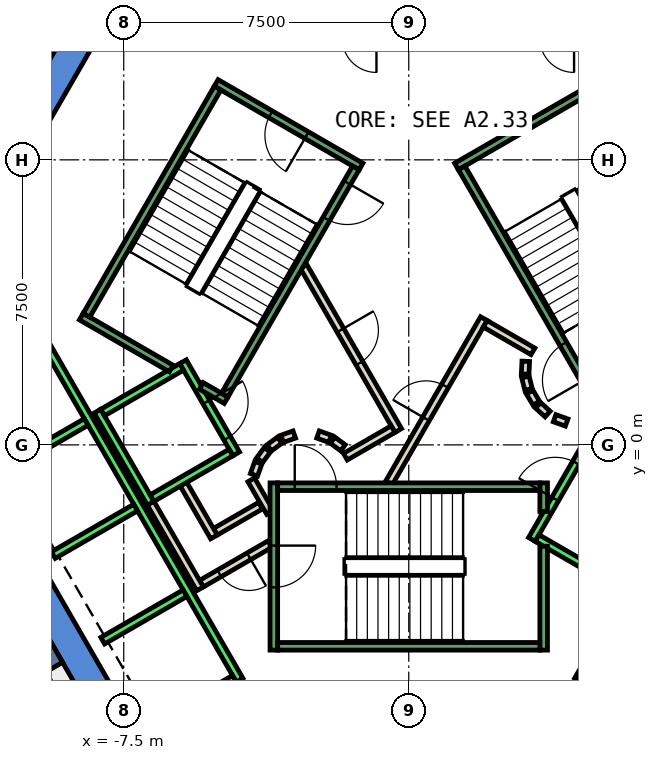
"""IFC4 building model, lengths in metres.
Left out: names, types, materials, properties, quantities, classifications, styles, units other than length and angle.
Written with IfcOpenShell. Run it as: python <this file> out.ifc"""

import sys

from ifc_helpers import new_model, si_unit, direction, frame, frame_2d, origin, place, context, subcontext, project, spatial, polyline, rectangle, outline, extrude, element, fill, save


model = new_model("IFC4")
c1 = context("Model", 3, precision=1e-05, world=origin(), true_north=direction((0.0, 1.0)))
c2 = subcontext(c1, "Body", "Model", "MODEL_VIEW")
j1 = project(units=[si_unit("LENGTHUNIT", "METRE"), si_unit("PLANEANGLEUNIT", "RADIAN")], contexts=[c1])
p1 = place(None, origin())
s1 = spatial("IfcSite", under=j1, at=p1, CompositionType="ELEMENT")
p2 = place(p1, origin())
s2 = spatial("IfcBuilding", under=s1, at=p2, CompositionType="ELEMENT")
p3 = place(p2, frame((0.0, 0.0, 163.4)))
s3 = spatial("IfcBuildingStorey", under=s2, at=p3, CompositionType="ELEMENT", Elevation=163.4)
p4 = place(p3, frame((0.0, 0.0, -0.4)))
e1 = element("IfcWall", 1, at=p4, inside=s3, PredefinedType="SHEAR", context=c2, shape_type="SweptSolid", body=[
    extrude(outline(polyline([(-12.267, 5.252), (-11.575, 4.852), (-6.466, 13.7), (-6.928, 14.5), (-12.267, 5.252)])), origin(), (0.0, 0.0, 1.0), 4.2),
])
p5 = place(p3, frame((0.0, 0.0, -0.4)))
e2 = element("IfcWall", 2, at=p5, inside=s3, PredefinedType="SHEAR", context=c2, shape_type="SweptSolid", body=[
    extrude(outline(polyline([(-13.856, 2.5), (-6.928, -9.5), (-6.466, -8.7), (-12.933, 2.5), (-13.856, 2.5)])), origin(), (0.0, 0.0, 1.0), 4.2),
])
p6 = place(p3, frame((-9.31, -5.375, -0.4), z_axis=(0.0, 0.0, 1.0), x_axis=(-0.866017533419, -0.500013631625, 0.0)))
e3 = element("IfcWall", 3, at=p6, inside=s3, PredefinedType="SHEAR", context=c2, shape_type="SweptSolid", body=[
    extrude(rectangle(XDim=9.0, YDim=0.8, at=frame_2d((4.5, 0.0))), origin(), (0.0, 0.0, 1.0), 4.2),
])
p7 = place(p3, frame((-3.9, -1.599, 0.0), z_axis=(0.0, 0.0, 1.0), x_axis=(-0.865969445389, -0.500096910261, 0.0)))
e4 = element("IfcWall", 4, at=p7, inside=s3, PredefinedType="PARTITIONING", context=c2, shape_type="SweptSolid", body=[
    extrude(rectangle(XDim=1.373, YDim=0.2, at=frame_2d((0.687, 0.0))), origin(), (0.0, 0.0, 1.0), 3.8),
])
p8 = place(p3, frame((-5.126, -2.422, 0.0), z_axis=(0.0, 0.0, 1.0), x_axis=(-0.500062241894, 0.865989465428, 0.0)))
e5 = element("IfcWall", 5, at=p8, inside=s3, PredefinedType="PARTITIONING", context=c2, shape_type="SweptSolid", body=[
    extrude(rectangle(XDim=1.7, YDim=0.2, at=frame_2d((0.85, 0.0))), origin(), (0.0, 0.0, 1.0), 3.8),
])
p9 = place(p3, frame((-3.65, -2.61, 0.0), z_axis=(0.0, 0.0, 1.0), x_axis=(-0.866072462134, -0.499918483688, 0.0)))
e6 = element("IfcWall", 6, at=p9, inside=s3, PredefinedType="PARTITIONING", context=c2, shape_type="SweptSolid", body=[
    extrude(rectangle(XDim=2.084, YDim=0.2, at=frame_2d((1.042, 0.0))), origin(), (0.0, 0.0, 1.0), 3.8),
])
p10 = place(p9, frame((0.642, 0.0, 0.0)))
e7 = element("IfcOpeningElement", 7, at=p10, cuts=e6, PredefinedType="OPENING", context=c2, shape_type="SweptSolid", body=[
    extrude(rectangle(XDim=0.9, YDim=2.1, at=frame_2d((0.45, 1.05))), frame((0.0, 0.11, 0.0), z_axis=(0.0, -1.0, 0.0), x_axis=(1.0, 0.0, 0.0)), (0.0, 0.0, 1.0), 0.22),
])
p11 = place(p3, frame((-5.492, -3.788, 0.0), z_axis=(0.0, 0.0, 1.0), x_axis=(-0.500008949224, 0.866020236886, 0.0)))
e8 = element("IfcWall", 8, at=p11, inside=s3, PredefinedType="PARTITIONING", context=c2, shape_type="SweptSolid", body=[
    extrude(rectangle(XDim=2.68, YDim=0.2, at=frame_2d((1.34, 0.0))), origin(), (0.0, 0.0, 1.0), 3.8),
])
p12 = place(p3, frame((-4.145, -0.92, 0.0), z_axis=(0.0, 0.0, 1.0), x_axis=(0.499743786207, -0.866173278362, 0.0)))
e9 = element("IfcWall", 9, at=p12, inside=s3, PredefinedType="PARTITIONING", context=c2, shape_type="SweptSolid", body=[
    extrude(rectangle(XDim=0.991, YDim=0.2, at=frame_2d((0.495, 0.0))), origin(), (0.0, 0.0, 1.0), 3.8),
])
p13 = place(p3, frame((-0.52, -1.0, 0.0), z_axis=(0.0, 0.0, 1.0), x_axis=(0.50011622646, 0.865958290007, 0.0)))
e10 = element("IfcWall", 10, at=p13, inside=s3, PredefinedType="PARTITIONING", context=c2, shape_type="SweptSolid", body=[
    extrude(rectangle(XDim=4.991, YDim=0.2, at=frame_2d((2.496, 0.0))), origin(), (0.0, 0.0, 1.0), 3.8),
])
p14 = place(p13, frame((1.945, 0.0, 0.0)))
e11 = element("IfcOpeningElement", 11, at=p14, cuts=e10, PredefinedType="OPENING", context=c2, shape_type="SweptSolid", body=[
    extrude(rectangle(XDim=1.0, YDim=2.1, at=frame_2d((0.5, 1.05))), frame((0.0, 0.11, 0.0), z_axis=(0.0, -1.0, 0.0), x_axis=(1.0, 0.0, 0.0)), (0.0, 0.0, 1.0), 0.22),
])
p15 = place(p3, frame((2.012, 3.186, 0.0), z_axis=(0.0, 0.0, 1.0), x_axis=(0.865891012941, -0.500232699559, 0.0)))
e12 = element("IfcWall", 12, at=p15, inside=s3, PredefinedType="PARTITIONING", context=c2, shape_type="SweptSolid", body=[
    extrude(rectangle(XDim=1.449, YDim=0.2, at=frame_2d((0.725, 0.0))), origin(), (0.0, 0.0, 1.0), 3.8),
])
p16 = place(p3, frame((3.079, 2.199, 0.0), z_axis=(0.0, 0.0, 1.0), x_axis=(-0.047771483479, -0.998858290933, 0.0)))
e13 = element("IfcWall", 13, at=p16, inside=s3, PredefinedType="PARTITIONING", context=c2, shape_type="SweptSolid", body=[
    extrude(rectangle(XDim=0.337, YDim=0.2, at=frame_2d((0.169, 0.0))), origin(), (0.0, 0.0, 1.0), 3.8),
])
p17 = place(p3, frame((3.07, 1.786, 0.0), z_axis=(0.0, 0.0, 1.0), x_axis=(0.242705583207, -0.970099994784, 0.0)))
e14 = element("IfcWall", 14, at=p17, inside=s3, PredefinedType="PARTITIONING", context=c2, shape_type="SweptSolid", body=[
    extrude(rectangle(XDim=0.338, YDim=0.2, at=frame_2d((0.169, 0.0))), origin(), (0.0, 0.0, 1.0), 3.8),
])
for number, where, z_axis, x_axis in (
    (15, (3.182, 1.388, 0.0), (0.0, 0.0, 1.0), (0.512, -0.859, 0.0)),
    (16, (3.404, 1.039, 0.0), (0.0, 0.0, 1.0), (0.74, -0.672, 0.0)),
):
    element("IfcWall", number, at=place(p3, frame(where, z_axis=z_axis, x_axis=x_axis)), inside=s3, PredefinedType="PARTITIONING", context=c2, shape_type="SweptSolid", body=[
        extrude(rectangle(XDim=0.338, YDim=0.2, at=frame_2d((0.169, 0.0))), origin(), (0.0, 0.0, 1.0), 3.8),
    ])
p18 = place(p3, frame((3.838, 0.702, 0.0), z_axis=(0.0, 0.0, 1.0), x_axis=(0.941035081519, -0.338308993895, 0.0)))
e17 = element("IfcWall", 17, at=p18, inside=s3, PredefinedType="PARTITIONING", context=c2, shape_type="SweptSolid", body=[
    extrude(rectangle(XDim=0.337, YDim=0.2, at=frame_2d((0.168, 0.0))), origin(), (0.0, 0.0, 1.0), 3.8),
])
p19 = place(p3, frame((-2.771, 4.7, 0.0), z_axis=(0.0, 0.0, 1.0), x_axis=(0.499969479948, -0.866043023828, 0.0)))
e18 = element("IfcWall", 18, at=p19, inside=s3, PredefinedType="PARTITIONING", context=c2, shape_type="SweptSolid", body=[
    extrude(rectangle(XDim=4.99, YDim=0.2, at=frame_2d((2.495, 0.0))), origin(), (0.0, 0.0, 1.0), 3.8),
])
p20 = place(p19, frame((1.945, 0.0, 0.0)))
e19 = element("IfcOpeningElement", 19, at=p20, cuts=e18, PredefinedType="OPENING", context=c2, shape_type="SweptSolid", body=[
    extrude(rectangle(XDim=1.0, YDim=2.1, at=frame_2d((0.5, 1.05))), frame((0.0, 0.11, 0.0), z_axis=(0.0, -1.0, 0.0), x_axis=(1.0, 0.0, 0.0)), (0.0, 0.0, 1.0), 0.22),
])
p21 = place(p3, frame((-0.412, 0.414, 0.0), z_axis=(0.0, 0.0, 1.0), x_axis=(-0.866017369001, -0.500013916395, 0.0)))
e20 = element("IfcWall", 20, at=p21, inside=s3, PredefinedType="PARTITIONING", context=c2, shape_type="SweptSolid", body=[
    extrude(rectangle(XDim=1.45, YDim=0.2, at=frame_2d((0.725, 0.0))), origin(), (0.0, 0.0, 1.0), 3.8),
])
p22 = place(p3, frame((-1.731, -0.077, 0.0), z_axis=(0.0, 0.0, 1.0), x_axis=(-0.804311165252, 0.594208338422, 0.0)))
e21 = element("IfcWall", 21, at=p22, inside=s3, PredefinedType="PARTITIONING", context=c2, shape_type="SweptSolid", body=[
    extrude(rectangle(XDim=0.338, YDim=0.2, at=frame_2d((0.169, 0.0))), origin(), (0.0, 0.0, 1.0), 3.8),
])
p23 = place(p3, frame((-2.07, 0.16, 0.0), z_axis=(0.0, 0.0, 1.0), x_axis=(-0.942199461132, 0.335052496547, 0.0)))
e22 = element("IfcWall", 22, at=p23, inside=s3, PredefinedType="PARTITIONING", context=c2, shape_type="SweptSolid", body=[
    extrude(rectangle(XDim=0.337, YDim=0.2, at=frame_2d((0.169, 0.0))), origin(), (0.0, 0.0, 1.0), 3.8),
])
p24 = place(p3, frame((-3.012, 0.273, 0.0), z_axis=(0.0, 0.0, 1.0), x_axis=(-0.942280615813, -0.334824194261, 0.0)))
e23 = element("IfcWall", 23, at=p24, inside=s3, PredefinedType="PARTITIONING", context=c2, shape_type="SweptSolid", body=[
    extrude(rectangle(XDim=0.338, YDim=0.2, at=frame_2d((0.169, 0.0))), origin(), (0.0, 0.0, 1.0), 3.8),
])
p25 = place(p3, frame((-3.397, 0.124, 0.0), z_axis=(0.0, 0.0, 1.0), x_axis=(-0.804311165252, -0.594208338422, 0.0)))
e24 = element("IfcWall", 24, at=p25, inside=s3, PredefinedType="PARTITIONING", context=c2, shape_type="SweptSolid", body=[
    extrude(rectangle(XDim=0.338, YDim=0.2, at=frame_2d((0.169, 0.0))), origin(), (0.0, 0.0, 1.0), 3.8),
])
p26 = place(p3, frame((-3.723, -0.131, 0.0), z_axis=(0.0, 0.0, 1.0), x_axis=(-0.594675113454, -0.803966112121, 0.0)))
e25 = element("IfcWall", 25, at=p26, inside=s3, PredefinedType="PARTITIONING", context=c2, shape_type="SweptSolid", body=[
    extrude(rectangle(XDim=0.338, YDim=0.2, at=frame_2d((0.169, 0.0))), origin(), (0.0, 0.0, 1.0), 3.8),
])
p27 = place(p3, frame((-3.96, -0.47, 0.0), z_axis=(0.0, 0.0, 1.0), x_axis=(-0.334824194261, -0.942280615813, 0.0)))
e26 = element("IfcWall", 26, at=p27, inside=s3, PredefinedType="PARTITIONING", context=c2, shape_type="SweptSolid", body=[
    extrude(rectangle(XDim=0.338, YDim=0.2, at=frame_2d((0.169, 0.0))), origin(), (0.0, 0.0, 1.0), 3.8),
])
p28 = place(p3, frame((-9.246, -6.71, 0.0), z_axis=(0.0, 0.0, 1.0), x_axis=(-0.499570510076, 0.86627322795, 0.0)))
e27 = element("IfcWall", 27, at=p28, inside=s3, PredefinedType="PARTITIONING", context=c2, shape_type="SweptSolid", body=[
    extrude(rectangle(XDim=0.788, YDim=0.2, at=frame_2d((0.394, 0.0))), origin(), (0.0, 0.0, 1.0), 3.8),
])
p29 = place(p3, frame((-5.94, 2.188, 0.0), z_axis=(0.0, 0.0, 1.0), x_axis=(0.49994636267, -0.866056369097, 0.0)))
e28 = element("IfcWall", 28, at=p29, inside=s3, PredefinedType="STANDARD", context=c2, shape_type="SweptSolid", body=[
    extrude(rectangle(XDim=2.8, YDim=0.2, at=frame_2d((1.4, 0.0))), origin(), (0.0, 0.0, 1.0), 3.8),
])
p30 = place(p29, frame((1.225, 0.0, 0.0)))
e29 = element("IfcOpeningElement", 29, at=p30, cuts=e28, PredefinedType="OPENING", context=c2, shape_type="SweptSolid", body=[
    extrude(rectangle(XDim=1.1, YDim=2.1, at=frame_2d((0.55, 1.05))), frame((0.0, 0.11, 0.0), z_axis=(0.0, -1.0, 0.0), x_axis=(1.0, 0.0, 0.0)), (0.0, 0.0, 1.0), 0.22),
])
p31 = place(p3, frame((-8.192, 0.888, 0.0), z_axis=(0.0, 0.0, 1.0), x_axis=(0.49994636267, -0.866056369097, 0.0)))
e30 = element("IfcWall", 30, at=p31, inside=s3, PredefinedType="STANDARD", context=c2, shape_type="SweptSolid", body=[
    extrude(rectangle(XDim=2.8, YDim=0.2, at=frame_2d((1.4, 0.0))), origin(), (0.0, 0.0, 1.0), 3.8),
])
for number, where, z_axis, x_axis in (
    (31, (-5.977, 2.052, 0.0), (0.0, 0.0, 1.0), (-0.866, -0.5, 0.0)),
    (32, (-4.677, -0.2, 0.0), (0.0, 0.0, 1.0), (-0.866, -0.5, 0.0)),
):
    element("IfcWall", number, at=place(p3, frame(where, z_axis=z_axis, x_axis=x_axis)), inside=s3, PredefinedType="STANDARD", context=c2, shape_type="SweptSolid", body=[
        extrude(rectangle(XDim=2.399, YDim=0.2, at=frame_2d((1.2, 0.0))), origin(), (0.0, 0.0, 1.0), 3.8),
    ])
p32 = place(p3, frame((-9.751, 2.99, 0.0), z_axis=(0.0, 0.0, 1.0), x_axis=(0.50000090737, -0.866024879913, 0.0)))
e33 = element("IfcWall", 33, at=p32, inside=s3, PredefinedType="STANDARD", context=c2, shape_type="SweptSolid", body=[
    extrude(rectangle(XDim=10.6, YDim=0.2, at=frame_2d((5.3, 0.0))), origin(), (0.0, 0.0, 1.0), 3.8),
])
for number, where, z_axis, x_axis in (
    (34, (-8.488, 0.602, 0.0), (0.0, 0.0, 1.0), (-0.866, -0.5, 0.0)),
    (35, (-7.188, -1.65, 0.0), (0.0, 0.0, 1.0), (-0.866, -0.5, 0.0)),
    (36, (-5.888, -3.902, 0.0), (0.0, 0.0, 1.0), (-0.866, -0.5, 0.0)),
    (37, (-4.588, -6.153, 0.0), (0.0, 0.0, 1.0), (-0.866, -0.5, 0.0)),
):
    element("IfcWall", number, at=place(p3, frame(where, z_axis=z_axis, x_axis=x_axis)), inside=s3, PredefinedType="STANDARD", context=c2, shape_type="SweptSolid", body=[
        extrude(rectangle(XDim=2.5, YDim=0.2, at=frame_2d((1.25, 0.0))), origin(), (0.0, 0.0, 1.0), 3.8),
    ])
p33 = place(p3, frame((3.24, -2.488, 0.0), z_axis=(0.0, 0.0, 1.0), x_axis=(0.49994636267, 0.866056369097, 0.0)))
e38 = element("IfcWall", 38, at=p33, inside=s3, PredefinedType="STANDARD", context=c2, shape_type="SweptSolid", body=[
    extrude(rectangle(XDim=2.8, YDim=0.2, at=frame_2d((1.4, 0.0))), origin(), (0.0, 0.0, 1.0), 3.8),
])
p34 = place(p33, frame((1.225, 0.0, 0.0)))
e39 = element("IfcOpeningElement", 39, at=p34, cuts=e38, PredefinedType="OPENING", context=c2, shape_type="SweptSolid", body=[
    extrude(rectangle(XDim=1.1, YDim=2.1, at=frame_2d((0.55, 1.05))), frame((0.0, 0.11, 0.0), z_axis=(0.0, -1.0, 0.0), x_axis=(1.0, 0.0, 0.0)), (0.0, 0.0, 1.0), 0.22),
])
p35 = place(p3, frame((3.377, -2.452, 0.0), z_axis=(0.0, 0.0, 1.0), x_axis=(0.865955154139, -0.50012165622, 0.0)))
e40 = element("IfcWall", 40, at=p35, inside=s3, PredefinedType="STANDARD", context=c2, shape_type="SweptSolid", body=[
    extrude(rectangle(XDim=2.4, YDim=0.2, at=frame_2d((1.2, 0.0))), origin(), (0.0, 0.0, 1.0), 3.8),
])
p36 = place(p3, frame((4.451, -6.19, 0.0), z_axis=(0.0, 0.0, 1.0), x_axis=(0.50000090737, 0.866024879913, 0.0)))
e41 = element("IfcWall", 41, at=p36, inside=s3, PredefinedType="STANDARD", context=c2, shape_type="SweptSolid", body=[
    extrude(rectangle(XDim=10.6, YDim=0.2, at=frame_2d((5.3, 0.0))), origin(), (0.0, 0.0, 1.0), 3.8),
])
p37 = place(p3, frame((-3.55, -1.0, 0.0), z_axis=(0.0, 0.0, 1.0), x_axis=(0.0, -1.0, 0.0)))
e42 = element("IfcWall", 42, at=p37, inside=s3, PredefinedType="STANDARD", context=c2, shape_type="SweptSolid", body=[
    extrude(rectangle(XDim=4.4, YDim=0.2, at=frame_2d((2.2, 0.0))), origin(), (0.0, 0.0, 1.0), 3.8),
])
p38 = place(p37, frame((1.65, 0.0, 0.0)))
e43 = element("IfcOpeningElement", 43, at=p38, cuts=e42, PredefinedType="OPENING", context=c2, shape_type="SweptSolid", body=[
    extrude(rectangle(XDim=1.1, YDim=2.2, at=frame_2d((0.55, 1.1))), frame((0.0, 0.11, 0.0), z_axis=(0.0, -1.0, 0.0), x_axis=(1.0, 0.0, 0.0)), (0.0, 0.0, 1.0), 0.22),
])
p39 = place(p3, frame((3.55, -2.667, 0.0), z_axis=(0.0, 0.0, 1.0), x_axis=(0.0, -1.0, 0.0)))
e44 = element("IfcWall", 44, at=p39, inside=s3, PredefinedType="STANDARD", context=c2, shape_type="SweptSolid", body=[
    extrude(rectangle(XDim=2.733, YDim=0.2, at=frame_2d((1.366, 0.0))), origin(), (0.0, 0.0, 1.0), 3.8),
])
p40 = place(p3, frame((3.55, -1.0, 0.0), z_axis=(0.0, 0.0, 1.0), x_axis=(0.0, -1.0, 0.0)))
e45 = element("IfcWall", 45, at=p40, inside=s3, PredefinedType="STANDARD", context=c2, shape_type="SweptSolid", body=[
    extrude(rectangle(XDim=0.751, YDim=0.2, at=frame_2d((0.375, 0.0))), origin(), (0.0, 0.0, 1.0), 3.8),
])
p41 = place(p3, frame((-3.45, -1.1, 0.0), z_axis=(0.0, 0.0, 1.0), x_axis=(1.0, 0.0, 0.0)))
e46 = element("IfcWall", 46, at=p41, inside=s3, PredefinedType="STANDARD", context=c2, shape_type="SweptSolid", body=[
    extrude(rectangle(XDim=6.9, YDim=0.2, at=frame_2d((3.45, 0.0))), origin(), (0.0, 0.0, 1.0), 3.8),
])
p42 = place(p41, frame((0.45, 0.0, 0.0)))
e47 = element("IfcOpeningElement", 47, at=p42, cuts=e46, PredefinedType="OPENING", context=c2, shape_type="SweptSolid", body=[
    extrude(rectangle(XDim=1.1, YDim=2.2, at=frame_2d((0.55, 1.1))), frame((0.0, 0.11, 0.0), z_axis=(0.0, -1.0, 0.0), x_axis=(1.0, 0.0, 0.0)), (0.0, 0.0, 1.0), 0.22),
])
p43 = place(p3, frame((-3.45, -5.3, 0.0), z_axis=(0.0, 0.0, 1.0), x_axis=(1.0, 0.0, 0.0)))
e48 = element("IfcWall", 48, at=p43, inside=s3, PredefinedType="STANDARD", context=c2, shape_type="SweptSolid", body=[
    extrude(rectangle(XDim=6.9, YDim=0.2, at=frame_2d((3.45, 0.0))), origin(), (0.0, 0.0, 1.0), 3.8),
])
p44 = place(p3, frame((1.256, 7.324, 0.0), z_axis=(0.0, 0.0, 1.0), x_axis=(0.866046073146, 0.499964197906, 0.0)))
e49 = element("IfcWall", 49, at=p44, inside=s3, PredefinedType="STANDARD", context=c2, shape_type="SweptSolid", body=[
    extrude(rectangle(XDim=4.4, YDim=0.2, at=frame_2d((2.2, 0.0))), origin(), (0.0, 0.0, 1.0), 3.8),
])
p45 = place(p3, frame((4.843, 1.312, 0.0), z_axis=(0.0, 0.0, 1.0), x_axis=(-0.499963383562, 0.866046543262, 0.0)))
e50 = element("IfcWall", 50, at=p45, inside=s3, PredefinedType="STANDARD", context=c2, shape_type="SweptSolid", body=[
    extrude(rectangle(XDim=6.9, YDim=0.2, at=frame_2d((3.45, 0.0))), origin(), (0.0, 0.0, 1.0), 3.8),
])
p46 = place(p45, frame((0.45, 0.0, 0.0)))
e51 = element("IfcOpeningElement", 51, at=p46, cuts=e50, PredefinedType="OPENING", context=c2, shape_type="SweptSolid", body=[
    extrude(rectangle(XDim=1.1, YDim=2.2, at=frame_2d((0.55, 1.1))), frame((0.0, 0.11, 0.0), z_axis=(0.0, -1.0, 0.0), x_axis=(1.0, 0.0, 0.0)), (0.0, 0.0, 1.0), 0.22),
])
p47 = place(p3, frame((-1.256, 7.324, 0.0), z_axis=(0.0, 0.0, 1.0), x_axis=(-0.866046073146, 0.499964197906, 0.0)))
e52 = element("IfcWall", 52, at=p47, inside=s3, PredefinedType="STANDARD", context=c2, shape_type="SweptSolid", body=[
    extrude(rectangle(XDim=4.4, YDim=0.2, at=frame_2d((2.2, 0.0))), origin(), (0.0, 0.0, 1.0), 3.8),
])
p48 = place(p47, frame((1.65, 0.0, 0.0)))
e53 = element("IfcOpeningElement", 53, at=p48, cuts=e52, PredefinedType="OPENING", context=c2, shape_type="SweptSolid", body=[
    extrude(rectangle(XDim=1.1, YDim=2.2, at=frame_2d((0.55, 1.1))), frame((0.0, 0.11, 0.0), z_axis=(0.0, -1.0, 0.0), x_axis=(1.0, 0.0, 0.0)), (0.0, 0.0, 1.0), 0.22),
])
p49 = place(p3, frame((-6.25, 2.01, 0.0), z_axis=(0.0, 0.0, 1.0), x_axis=(-0.86611865017, 0.499838457731, 0.0)))
e54 = element("IfcWall", 54, at=p49, inside=s3, PredefinedType="STANDARD", context=c2, shape_type="SweptSolid", body=[
    extrude(rectangle(XDim=2.733, YDim=0.2, at=frame_2d((1.366, 0.0))), origin(), (0.0, 0.0, 1.0), 3.8),
])
p50 = place(p3, frame((-4.806, 1.176, 0.0), z_axis=(0.0, 0.0, 1.0), x_axis=(-0.866558586415, 0.499075361355, 0.0)))
e55 = element("IfcWall", 55, at=p50, inside=s3, PredefinedType="STANDARD", context=c2, shape_type="SweptSolid", body=[
    extrude(rectangle(XDim=0.751, YDim=0.2, at=frame_2d((0.376, 0.0))), origin(), (0.0, 0.0, 1.0), 3.8),
])
p51 = place(p3, frame((-1.393, 7.288, 0.0), z_axis=(0.0, 0.0, 1.0), x_axis=(-0.499963383562, -0.866046543262, 0.0)))
e56 = element("IfcWall", 56, at=p51, inside=s3, PredefinedType="STANDARD", context=c2, shape_type="SweptSolid", body=[
    extrude(rectangle(XDim=6.9, YDim=0.2, at=frame_2d((3.45, 0.0))), origin(), (0.0, 0.0, 1.0), 3.8),
])
p52 = place(p51, frame((0.45, 0.0, 0.0)))
e57 = element("IfcOpeningElement", 57, at=p52, cuts=e56, PredefinedType="OPENING", context=c2, shape_type="SweptSolid", body=[
    extrude(rectangle(XDim=1.1, YDim=2.2, at=frame_2d((0.55, 1.1))), frame((0.0, 0.11, 0.0), z_axis=(0.0, -1.0, 0.0), x_axis=(1.0, 0.0, 0.0)), (0.0, 0.0, 1.0), 0.22),
])
p53 = place(p3, frame((-5.03, 9.388, 0.0), z_axis=(0.0, 0.0, 1.0), x_axis=(-0.499978703459, -0.866037698999, 0.0)))
e58 = element("IfcWall", 58, at=p53, inside=s3, PredefinedType="STANDARD", context=c2, shape_type="SweptSolid", body=[
    extrude(rectangle(XDim=6.9, YDim=0.2, at=frame_2d((3.45, 0.0))), origin(), (0.0, 0.0, 1.0), 3.8),
])
p54 = place(p14, origin())
e59 = element("IfcDoor", 59, at=p54, inside=s3, OperationType="SINGLE_SWING_LEFT", PredefinedType="DOOR", context=c2, shape_type="SweptSolid", body=[
    extrude(rectangle(XDim=1.0, YDim=2.1, at=frame_2d((0.5, 1.05))), frame((0.0, 0.025, 0.0), z_axis=(0.0, -1.0, 0.0), x_axis=(1.0, 0.0, 0.0)), (0.0, 0.0, 1.0), 0.05),
])
fill(e11, e59)
p55 = place(p20, origin())
e60 = element("IfcDoor", 60, at=p55, inside=s3, OperationType="SINGLE_SWING_RIGHT", PredefinedType="DOOR", context=c2, shape_type="SweptSolid", body=[
    extrude(rectangle(XDim=1.0, YDim=2.1, at=frame_2d((0.5, 1.05))), frame((0.0, 0.025, 0.0), z_axis=(0.0, -1.0, 0.0), x_axis=(1.0, 0.0, 0.0)), (0.0, 0.0, 1.0), 0.05),
])
fill(e19, e60)
p56 = place(p10, origin())
e61 = element("IfcDoor", 61, at=p56, inside=s3, OperationType="SINGLE_SWING_LEFT", PredefinedType="DOOR", context=c2, shape_type="SweptSolid", body=[
    extrude(rectangle(XDim=0.9, YDim=2.1, at=frame_2d((0.45, 1.05))), frame((0.0, 0.025, 0.0), z_axis=(0.0, -1.0, 0.0), x_axis=(1.0, 0.0, 0.0)), (0.0, 0.0, 1.0), 0.05),
])
fill(e7, e61)
p57 = place(p34, origin())
e62 = element("IfcDoor", 62, at=p57, inside=s3, OperationType="SLIDING_TO_LEFT", PredefinedType="DOOR", context=c2, shape_type="SweptSolid", body=[
    extrude(rectangle(XDim=1.1, YDim=2.1, at=frame_2d((0.55, 1.05))), frame((0.0, 0.025, 0.0), z_axis=(0.0, -1.0, 0.0), x_axis=(1.0, 0.0, 0.0)), (0.0, 0.0, 1.0), 0.05),
])
fill(e39, e62)
p58 = place(p30, origin())
e63 = element("IfcDoor", 63, at=p58, inside=s3, OperationType="SLIDING_TO_LEFT", PredefinedType="DOOR", context=c2, shape_type="SweptSolid", body=[
    extrude(rectangle(XDim=1.1, YDim=2.1, at=frame_2d((0.55, 1.05))), frame((0.0, 0.025, 0.0), z_axis=(0.0, -1.0, 0.0), x_axis=(1.0, 0.0, 0.0)), (0.0, 0.0, 1.0), 0.05),
])
fill(e29, e63)
p59 = place(p42, origin())
e64 = element("IfcDoor", 64, at=p59, inside=s3, OperationType="SINGLE_SWING_LEFT", PredefinedType="DOOR", context=c2, shape_type="SweptSolid", body=[
    extrude(rectangle(XDim=1.1, YDim=2.2, at=frame_2d((0.55, 1.1))), frame((0.0, 0.025, 0.0), z_axis=(0.0, -1.0, 0.0), x_axis=(1.0, 0.0, 0.0)), (0.0, 0.0, 1.0), 0.05),
])
fill(e47, e64)
p60 = place(p38, origin())
e65 = element("IfcDoor", 65, at=p60, inside=s3, OperationType="SINGLE_SWING_LEFT", PredefinedType="DOOR", context=c2, shape_type="SweptSolid", body=[
    extrude(rectangle(XDim=1.1, YDim=2.2, at=frame_2d((0.55, 1.1))), frame((0.0, 0.025, 0.0), z_axis=(0.0, -1.0, 0.0), x_axis=(1.0, 0.0, 0.0)), (0.0, 0.0, 1.0), 0.05),
])
fill(e43, e65)
p61 = place(p46, origin())
e66 = element("IfcDoor", 66, at=p61, inside=s3, OperationType="SINGLE_SWING_LEFT", PredefinedType="DOOR", context=c2, shape_type="SweptSolid", body=[
    extrude(rectangle(XDim=1.1, YDim=2.2, at=frame_2d((0.55, 1.1))), frame((0.0, 0.025, 0.0), z_axis=(0.0, -1.0, 0.0), x_axis=(1.0, 0.0, 0.0)), (0.0, 0.0, 1.0), 0.05),
])
fill(e51, e66)
p62 = place(p52, origin())
e67 = element("IfcDoor", 67, at=p62, inside=s3, OperationType="SINGLE_SWING_LEFT", PredefinedType="DOOR", context=c2, shape_type="SweptSolid", body=[
    extrude(rectangle(XDim=1.1, YDim=2.2, at=frame_2d((0.55, 1.1))), frame((0.0, 0.025, 0.0), z_axis=(0.0, -1.0, 0.0), x_axis=(1.0, 0.0, 0.0)), (0.0, 0.0, 1.0), 0.05),
])
fill(e57, e67)
p63 = place(p48, origin())
e68 = element("IfcDoor", 68, at=p63, inside=s3, OperationType="SINGLE_SWING_LEFT", PredefinedType="DOOR", context=c2, shape_type="SweptSolid", body=[
    extrude(rectangle(XDim=1.1, YDim=2.2, at=frame_2d((0.55, 1.1))), frame((0.0, 0.025, 0.0), z_axis=(0.0, -1.0, 0.0), x_axis=(1.0, 0.0, 0.0)), (0.0, 0.0, 1.0), 0.05),
])
fill(e53, e68)
save(model, sys.argv[1])
